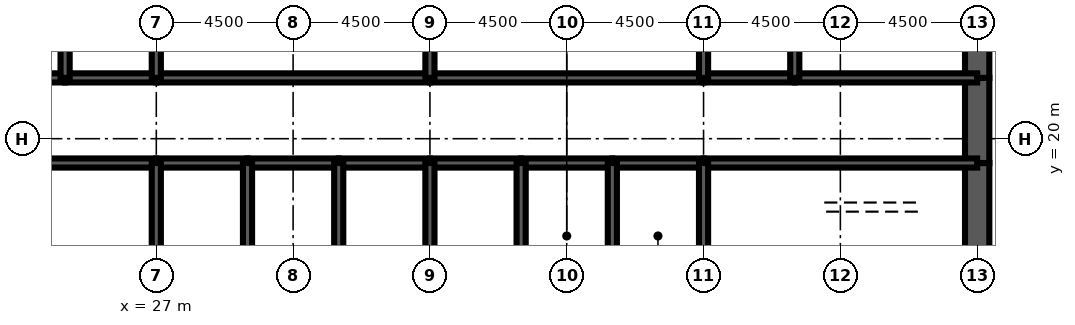
"""IFC4 building model, lengths in metres.
Left out: names, types, materials, properties, quantities, classifications, styles, units other than length and angle.
Written with IfcOpenShell. Run it as: python <this file> out.ifc"""

import sys

from ifc_helpers import new_model, si_unit, direction, frame, frame_2d, origin, place, context, subcontext, project, spatial, rectangle, extrude, element, fill, save


model = new_model("IFC4")
c1 = context("Model", 3, precision=1e-05, world=origin(), true_north=direction((0.0, 1.0)))
c2 = subcontext(c1, "Body", "Model", "MODEL_VIEW")
j1 = project(units=[si_unit("LENGTHUNIT", "METRE"), si_unit("PLANEANGLEUNIT", "RADIAN")], contexts=[c1])
p1 = place(None, origin())
s1 = spatial("IfcSite", under=j1, at=p1, CompositionType="ELEMENT")
p2 = place(p1, origin())
s2 = spatial("IfcBuilding", under=s1, at=p2, CompositionType="ELEMENT")
p3 = place(p2, frame((0.0, 0.0, 219.4)))
s3 = spatial("IfcBuildingStorey", under=s2, at=p3, CompositionType="ELEMENT", Elevation=219.4)
p4 = place(p3, frame((54.0, 16.0, 0.0), z_axis=(0.0, 0.0, 1.0), x_axis=(0.0, 1.0, 0.0)))
e1 = element("IfcWall", 1, at=p4, inside=s3, PredefinedType="SHEAR", context=c2, shape_type="SweptSolid", body=[
    extrude(rectangle(XDim=3.2, YDim=0.8, at=frame_2d((1.6, 0.0))), origin(), (0.0, 0.0, 1.0), 4.2),
])
p5 = place(p3, frame((54.0, 19.2, 0.0), z_axis=(0.0, 0.0, 1.0), x_axis=(0.0, 1.0, 0.0)))
e2 = element("IfcWall", 2, at=p5, inside=s3, PredefinedType="SHEAR", context=c2, shape_type="SweptSolid", body=[
    extrude(rectangle(XDim=2.8, YDim=0.8, at=frame_2d((1.4, 0.0))), origin(), (0.0, 0.0, 1.0), 4.2),
])
p6 = place(p5, frame((0.4, 0.0, 0.0)))
e3 = element("IfcOpeningElement", 3, at=p6, cuts=e2, PredefinedType="OPENING", context=c2, shape_type="SweptSolid", body=[
    extrude(rectangle(XDim=1.8, YDim=2.1, at=frame_2d((0.9, 1.05))), frame((0.0, 0.41, 0.0), z_axis=(0.0, -1.0, 0.0), x_axis=(1.0, 0.0, 0.0)), (0.0, 0.0, 1.0), 0.82),
])
p7 = place(p3, frame((54.0, 22.0, 0.0), z_axis=(0.0, 0.0, 1.0), x_axis=(0.0, 1.0, 0.0)))
e4 = element("IfcWall", 4, at=p7, inside=s3, PredefinedType="SHEAR", context=c2, shape_type="SweptSolid", body=[
    extrude(rectangle(XDim=4.0, YDim=0.8, at=frame_2d((2.0, 0.0))), origin(), (0.0, 0.0, 1.0), 4.2),
])
p8 = place(p3, frame((18.0, 19.2, 0.0), z_axis=(0.0, 0.0, 1.0), x_axis=(1.0, 0.0, 0.0)))
e5 = element("IfcWall", 5, at=p8, inside=s3, PredefinedType="SOLIDWALL", context=c2, shape_type="SweptSolid", body=[
    extrude(rectangle(XDim=9.0, YDim=0.3, at=frame_2d((4.5, 0.0))), origin(), (0.0, 0.0, 1.0), 4.2),
])
p9 = place(p8, frame((0.65, 0.0, 0.0)))
e6 = element("IfcOpeningElement", 6, at=p9, cuts=e5, PredefinedType="OPENING", context=c2, shape_type="SweptSolid", body=[
    extrude(rectangle(XDim=1.0, YDim=2.1, at=frame_2d((0.5, 1.05))), frame((0.0, 0.16, 0.0), z_axis=(0.0, -1.0, 0.0), x_axis=(1.0, 0.0, 0.0)), (0.0, 0.0, 1.0), 0.32),
])
p10 = place(p3, frame((27.0, 19.2, 0.0), z_axis=(0.0, 0.0, 1.0), x_axis=(1.0, 0.0, 0.0)))
e7 = element("IfcWall", 7, at=p10, inside=s3, PredefinedType="SOLIDWALL", context=c2, shape_type="SweptSolid", body=[
    extrude(rectangle(XDim=3.0, YDim=0.3, at=frame_2d((1.5, 0.0))), origin(), (0.0, 0.0, 1.0), 4.2),
])
p11 = place(p10, frame((0.95, 0.0, 0.0)))
e8 = element("IfcOpeningElement", 8, at=p11, cuts=e7, PredefinedType="OPENING", context=c2, shape_type="SweptSolid", body=[
    extrude(rectangle(XDim=1.1, YDim=2.2, at=frame_2d((0.55, 1.1))), frame((0.0, 0.16, 0.0), z_axis=(0.0, -1.0, 0.0), x_axis=(1.0, 0.0, 0.0)), (0.0, 0.0, 1.0), 0.32),
])
p12 = place(p3, frame((30.0, 19.2, 0.0), z_axis=(0.0, 0.0, 1.0), x_axis=(1.0, 0.0, 0.0)))
e9 = element("IfcWall", 9, at=p12, inside=s3, PredefinedType="SOLIDWALL", context=c2, shape_type="SweptSolid", body=[
    extrude(rectangle(XDim=3.0, YDim=0.3, at=frame_2d((1.5, 0.0))), origin(), (0.0, 0.0, 1.0), 4.2),
])
p13 = place(p12, frame((0.95, 0.0, 0.0)))
e10 = element("IfcOpeningElement", 10, at=p13, cuts=e9, PredefinedType="OPENING", context=c2, shape_type="SweptSolid", body=[
    extrude(rectangle(XDim=1.1, YDim=2.2, at=frame_2d((0.55, 1.1))), frame((0.0, 0.16, 0.0), z_axis=(0.0, -1.0, 0.0), x_axis=(1.0, 0.0, 0.0)), (0.0, 0.0, 1.0), 0.32),
])
p14 = place(p3, frame((33.0, 19.2, 0.0), z_axis=(0.0, 0.0, 1.0), x_axis=(1.0, 0.0, 0.0)))
e11 = element("IfcWall", 11, at=p14, inside=s3, PredefinedType="SOLIDWALL", context=c2, shape_type="SweptSolid", body=[
    extrude(rectangle(XDim=3.0, YDim=0.3, at=frame_2d((1.5, 0.0))), origin(), (0.0, 0.0, 1.0), 4.2),
])
p15 = place(p14, frame((0.95, 0.0, 0.0)))
e12 = element("IfcOpeningElement", 12, at=p15, cuts=e11, PredefinedType="OPENING", context=c2, shape_type="SweptSolid", body=[
    extrude(rectangle(XDim=1.1, YDim=2.2, at=frame_2d((0.55, 1.1))), frame((0.0, 0.16, 0.0), z_axis=(0.0, -1.0, 0.0), x_axis=(1.0, 0.0, 0.0)), (0.0, 0.0, 1.0), 0.32),
])
p16 = place(p3, frame((36.0, 19.2, 0.0), z_axis=(0.0, 0.0, 1.0), x_axis=(1.0, 0.0, 0.0)))
e13 = element("IfcWall", 13, at=p16, inside=s3, PredefinedType="SOLIDWALL", context=c2, shape_type="SweptSolid", body=[
    extrude(rectangle(XDim=3.0, YDim=0.3, at=frame_2d((1.5, 0.0))), origin(), (0.0, 0.0, 1.0), 4.2),
])
p17 = place(p16, frame((0.95, 0.0, 0.0)))
e14 = element("IfcOpeningElement", 14, at=p17, cuts=e13, PredefinedType="OPENING", context=c2, shape_type="SweptSolid", body=[
    extrude(rectangle(XDim=1.1, YDim=2.2, at=frame_2d((0.55, 1.1))), frame((0.0, 0.16, 0.0), z_axis=(0.0, -1.0, 0.0), x_axis=(1.0, 0.0, 0.0)), (0.0, 0.0, 1.0), 0.32),
])
p18 = place(p3, frame((39.0, 19.2, 0.0), z_axis=(0.0, 0.0, 1.0), x_axis=(1.0, 0.0, 0.0)))
e15 = element("IfcWall", 15, at=p18, inside=s3, PredefinedType="SOLIDWALL", context=c2, shape_type="SweptSolid", body=[
    extrude(rectangle(XDim=3.0, YDim=0.3, at=frame_2d((1.5, 0.0))), origin(), (0.0, 0.0, 1.0), 4.2),
])
p19 = place(p18, frame((1.0, 0.0, 0.0)))
e16 = element("IfcOpeningElement", 16, at=p19, cuts=e15, PredefinedType="OPENING", context=c2, shape_type="SweptSolid", body=[
    extrude(rectangle(XDim=1.0, YDim=2.1, at=frame_2d((0.5, 1.05))), frame((0.0, 0.16, 0.0), z_axis=(0.0, -1.0, 0.0), x_axis=(1.0, 0.0, 0.0)), (0.0, 0.0, 1.0), 0.32),
])
p20 = place(p3, frame((42.0, 19.2, 0.0), z_axis=(0.0, 0.0, 1.0), x_axis=(1.0, 0.0, 0.0)))
e17 = element("IfcWall", 17, at=p20, inside=s3, PredefinedType="SOLIDWALL", context=c2, shape_type="SweptSolid", body=[
    extrude(rectangle(XDim=3.0, YDim=0.3, at=frame_2d((1.5, 0.0))), origin(), (0.0, 0.0, 1.0), 4.2),
])
p21 = place(p20, frame((1.0, 0.0, 0.0)))
e18 = element("IfcOpeningElement", 18, at=p21, cuts=e17, PredefinedType="OPENING", context=c2, shape_type="SweptSolid", body=[
    extrude(rectangle(XDim=1.0, YDim=2.1, at=frame_2d((0.5, 1.05))), frame((0.0, 0.16, 0.0), z_axis=(0.0, -1.0, 0.0), x_axis=(1.0, 0.0, 0.0)), (0.0, 0.0, 1.0), 0.32),
])
p22 = place(p3, frame((45.0, 19.2, 0.0), z_axis=(0.0, 0.0, 1.0), x_axis=(1.0, 0.0, 0.0)))
e19 = element("IfcWall", 19, at=p22, inside=s3, PredefinedType="SOLIDWALL", context=c2, shape_type="SweptSolid", body=[
    extrude(rectangle(XDim=9.0, YDim=0.3, at=frame_2d((4.5, 0.0))), origin(), (0.0, 0.0, 1.0), 4.2),
])
p23 = place(p22, frame((7.35, 0.0, 0.0)))
e20 = element("IfcOpeningElement", 20, at=p23, cuts=e19, PredefinedType="OPENING", context=c2, shape_type="SweptSolid", body=[
    extrude(rectangle(XDim=1.0, YDim=2.1, at=frame_2d((0.5, 1.05))), frame((0.0, 0.16, 0.0), z_axis=(0.0, -1.0, 0.0), x_axis=(1.0, 0.0, 0.0)), (0.0, 0.0, 1.0), 0.32),
])
p24 = place(p3, frame((18.0, 22.0, 0.0), z_axis=(0.0, 0.0, 1.0), x_axis=(1.0, 0.0, 0.0)))
e21 = element("IfcWall", 21, at=p24, inside=s3, PredefinedType="SOLIDWALL", context=c2, shape_type="SweptSolid", body=[
    extrude(rectangle(XDim=6.0, YDim=0.3, at=frame_2d((3.0, 0.0))), origin(), (0.0, 0.0, 1.0), 4.2),
])
p25 = place(p24, frame((4.4, 0.0, 0.0)))
e22 = element("IfcOpeningElement", 22, at=p25, cuts=e21, PredefinedType="OPENING", context=c2, shape_type="SweptSolid", body=[
    extrude(rectangle(XDim=1.0, YDim=2.1, at=frame_2d((0.5, 1.05))), frame((0.0, 0.16, 0.0), z_axis=(0.0, -1.0, 0.0), x_axis=(1.0, 0.0, 0.0)), (0.0, 0.0, 1.0), 0.32),
])
p26 = place(p24, frame((0.8, 0.0, 0.0)))
e23 = element("IfcOpeningElement", 23, at=p26, cuts=e21, PredefinedType="OPENING", context=c2, shape_type="SweptSolid", body=[
    extrude(rectangle(XDim=1.0, YDim=2.1, at=frame_2d((0.5, 1.05))), frame((0.0, 0.16, 0.0), z_axis=(0.0, -1.0, 0.0), x_axis=(1.0, 0.0, 0.0)), (0.0, 0.0, 1.0), 0.32),
])
p27 = place(p3, frame((24.0, 22.0, 0.0), z_axis=(0.0, 0.0, 1.0), x_axis=(1.0, 0.0, 0.0)))
e24 = element("IfcWall", 24, at=p27, inside=s3, PredefinedType="SOLIDWALL", context=c2, shape_type="SweptSolid", body=[
    extrude(rectangle(XDim=3.0, YDim=0.3, at=frame_2d((1.5, 0.0))), origin(), (0.0, 0.0, 1.0), 4.2),
])
p28 = place(p27, frame((1.0, 0.0, 0.0)))
e25 = element("IfcOpeningElement", 25, at=p28, cuts=e24, PredefinedType="OPENING", context=c2, shape_type="SweptSolid", body=[
    extrude(rectangle(XDim=1.0, YDim=2.1, at=frame_2d((0.5, 1.05))), frame((0.0, 0.16, 0.0), z_axis=(0.0, -1.0, 0.0), x_axis=(1.0, 0.0, 0.0)), (0.0, 0.0, 1.0), 0.32),
])
p29 = place(p3, frame((27.0, 22.0, 0.0), z_axis=(0.0, 0.0, 1.0), x_axis=(1.0, 0.0, 0.0)))
e26 = element("IfcWall", 26, at=p29, inside=s3, PredefinedType="SOLIDWALL", context=c2, shape_type="SweptSolid", body=[
    extrude(rectangle(XDim=9.0, YDim=0.3, at=frame_2d((4.5, 0.0))), origin(), (0.0, 0.0, 1.0), 4.2),
])
p30 = place(p29, frame((4.0, 0.0, 0.0)))
e27 = element("IfcOpeningElement", 27, at=p30, cuts=e26, PredefinedType="OPENING", context=c2, shape_type="SweptSolid", body=[
    extrude(rectangle(XDim=1.0, YDim=2.1, at=frame_2d((0.5, 1.05))), frame((0.0, 0.16, 0.0), z_axis=(0.0, -1.0, 0.0), x_axis=(1.0, 0.0, 0.0)), (0.0, 0.0, 1.0), 0.32),
])
p31 = place(p3, frame((36.0, 22.0, 0.0), z_axis=(0.0, 0.0, 1.0), x_axis=(1.0, 0.0, 0.0)))
e28 = element("IfcWall", 28, at=p31, inside=s3, PredefinedType="SOLIDWALL", context=c2, shape_type="SweptSolid", body=[
    extrude(rectangle(XDim=9.0, YDim=0.3, at=frame_2d((4.5, 0.0))), origin(), (0.0, 0.0, 1.0), 4.2),
])
p32 = place(p31, frame((4.0, 0.0, 0.0)))
e29 = element("IfcOpeningElement", 29, at=p32, cuts=e28, PredefinedType="OPENING", context=c2, shape_type="SweptSolid", body=[
    extrude(rectangle(XDim=1.0, YDim=2.1, at=frame_2d((0.5, 1.05))), frame((0.0, 0.16, 0.0), z_axis=(0.0, -1.0, 0.0), x_axis=(1.0, 0.0, 0.0)), (0.0, 0.0, 1.0), 0.32),
])
p33 = place(p3, frame((45.0, 22.0, 0.0), z_axis=(0.0, 0.0, 1.0), x_axis=(1.0, 0.0, 0.0)))
e30 = element("IfcWall", 30, at=p33, inside=s3, PredefinedType="SOLIDWALL", context=c2, shape_type="SweptSolid", body=[
    extrude(rectangle(XDim=3.0, YDim=0.3, at=frame_2d((1.5, 0.0))), origin(), (0.0, 0.0, 1.0), 4.2),
])
p34 = place(p33, frame((1.0, 0.0, 0.0)))
e31 = element("IfcOpeningElement", 31, at=p34, cuts=e30, PredefinedType="OPENING", context=c2, shape_type="SweptSolid", body=[
    extrude(rectangle(XDim=1.0, YDim=2.1, at=frame_2d((0.5, 1.05))), frame((0.0, 0.16, 0.0), z_axis=(0.0, -1.0, 0.0), x_axis=(1.0, 0.0, 0.0)), (0.0, 0.0, 1.0), 0.32),
])
p35 = place(p3, frame((48.0, 22.0, 0.0), z_axis=(0.0, 0.0, 1.0), x_axis=(1.0, 0.0, 0.0)))
e32 = element("IfcWall", 32, at=p35, inside=s3, PredefinedType="SOLIDWALL", context=c2, shape_type="SweptSolid", body=[
    extrude(rectangle(XDim=6.0, YDim=0.3, at=frame_2d((3.0, 0.0))), origin(), (0.0, 0.0, 1.0), 4.2),
])
p36 = place(p35, frame((2.0, 0.0, 0.0)))
e33 = element("IfcOpeningElement", 33, at=p36, cuts=e32, PredefinedType="OPENING", context=c2, shape_type="SweptSolid", body=[
    extrude(rectangle(XDim=1.0, YDim=2.1, at=frame_2d((0.5, 1.05))), frame((0.0, 0.16, 0.0), z_axis=(0.0, -1.0, 0.0), x_axis=(1.0, 0.0, 0.0)), (0.0, 0.0, 1.0), 0.32),
])
p37 = place(p35, frame((4.05, 0.0, 0.0)))
e34 = element("IfcOpeningElement", 34, at=p37, cuts=e32, PredefinedType="OPENING", context=c2, shape_type="SweptSolid", body=[
    extrude(rectangle(XDim=1.0, YDim=2.1, at=frame_2d((0.5, 1.05))), frame((0.0, 0.16, 0.0), z_axis=(0.0, -1.0, 0.0), x_axis=(1.0, 0.0, 0.0)), (0.0, 0.0, 1.0), 0.32),
])
for number, where, z_axis, x_axis in (
    (35, (27.0, 16.0, 0.0), (0.0, 0.0, 1.0), (0.0, 1.0, 0.0)),
    (36, (30.0, 16.0, 0.0), (0.0, 0.0, 1.0), (0.0, 1.0, 0.0)),
    (37, (33.0, 16.0, 0.0), (0.0, 0.0, 1.0), (0.0, 1.0, 0.0)),
    (38, (36.0, 16.0, 0.0), (0.0, 0.0, 1.0), (0.0, 1.0, 0.0)),
    (39, (39.0, 16.0, 0.0), (0.0, 0.0, 1.0), (0.0, 1.0, 0.0)),
    (40, (42.0, 16.0, 0.0), (0.0, 0.0, 1.0), (0.0, 1.0, 0.0)),
    (41, (45.0, 16.0, 0.0), (0.0, 0.0, 1.0), (0.0, 1.0, 0.0)),
):
    element("IfcWall", number, at=place(p3, frame(where, z_axis=z_axis, x_axis=x_axis)), inside=s3, PredefinedType="SOLIDWALL", context=c2, shape_type="SweptSolid", body=[
        extrude(rectangle(XDim=3.2, YDim=0.3, at=frame_2d((1.6, 0.0))), origin(), (0.0, 0.0, 1.0), 4.2),
    ])
for number, where, z_axis, x_axis in (
    (42, (24.0, 22.0, 0.0), (0.0, 0.0, 1.0), (0.0, 1.0, 0.0)),
    (43, (27.0, 22.0, 0.0), (0.0, 0.0, 1.0), (0.0, 1.0, 0.0)),
    (44, (36.0, 22.0, 0.0), (0.0, 0.0, 1.0), (0.0, 1.0, 0.0)),
    (45, (45.0, 22.0, 0.0), (0.0, 0.0, 1.0), (0.0, 1.0, 0.0)),
    (46, (48.0, 22.0, 0.0), (0.0, 0.0, 1.0), (0.0, 1.0, 0.0)),
):
    element("IfcWall", number, at=place(p3, frame(where, z_axis=z_axis, x_axis=x_axis)), inside=s3, PredefinedType="SOLIDWALL", context=c2, shape_type="SweptSolid", body=[
        extrude(rectangle(XDim=4.0, YDim=0.3, at=frame_2d((2.0, 0.0))), origin(), (0.0, 0.0, 1.0), 4.2),
    ])
p38 = place(p3, frame((39.15, 17.35, 0.0), z_axis=(0.0, 0.0, 1.0), x_axis=(1.0, 0.0, 0.0)))
e47 = element("IfcWall", 47, at=p38, inside=s3, PredefinedType="SOLIDWALL", context=c2, shape_type="SweptSolid", body=[
    extrude(rectangle(XDim=2.7, YDim=0.3, at=frame_2d((1.35, 0.0))), origin(), (0.0, 0.0, 1.0), 4.04),
])
p39 = place(p38, frame((0.85, 0.0, 0.0)))
e48 = element("IfcOpeningElement", 48, at=p39, cuts=e47, PredefinedType="OPENING", context=c2, shape_type="SweptSolid", body=[
    extrude(rectangle(XDim=1.0, YDim=2.1, at=frame_2d((0.5, 1.05))), frame((0.0, 0.16, 0.0), z_axis=(0.0, -1.0, 0.0), x_axis=(1.0, 0.0, 0.0)), (0.0, 0.0, 1.0), 0.32),
])
p40 = place(p3, frame((42.15, 17.35, 0.0), z_axis=(0.0, 0.0, 1.0), x_axis=(1.0, 0.0, 0.0)))
e49 = element("IfcWall", 49, at=p40, inside=s3, PredefinedType="SOLIDWALL", context=c2, shape_type="SweptSolid", body=[
    extrude(rectangle(XDim=2.7, YDim=0.3, at=frame_2d((1.35, 0.0))), origin(), (0.0, 0.0, 1.0), 4.04),
])
p41 = place(p40, frame((0.85, 0.0, 0.0)))
e50 = element("IfcOpeningElement", 50, at=p41, cuts=e49, PredefinedType="OPENING", context=c2, shape_type="SweptSolid", body=[
    extrude(rectangle(XDim=1.0, YDim=2.1, at=frame_2d((0.5, 1.05))), frame((0.0, 0.16, 0.0), z_axis=(0.0, -1.0, 0.0), x_axis=(1.0, 0.0, 0.0)), (0.0, 0.0, 1.0), 0.32),
])
p42 = place(p3, frame((38.5, 22.15, 0.0), z_axis=(0.0, 0.0, 1.0), x_axis=(0.0, 1.0, 0.0)))
e51 = element("IfcWall", 51, at=p42, inside=s3, PredefinedType="PARTITIONING", context=c2, shape_type="SweptSolid", body=[
    extrude(rectangle(XDim=3.7, YDim=0.15, at=frame_2d((1.85, 0.0))), origin(), (0.0, 0.0, 1.0), 3.0),
])
p43 = place(p42, frame((2.2, 0.0, 0.0)))
e52 = element("IfcOpeningElement", 52, at=p43, cuts=e51, PredefinedType="OPENING", context=c2, shape_type="SweptSolid", body=[
    extrude(rectangle(XDim=1.0, YDim=2.1, at=frame_2d((0.5, 1.05))), frame((0.0, 0.085, 0.0), z_axis=(0.0, -1.0, 0.0), x_axis=(1.0, 0.0, 0.0)), (0.0, 0.0, 1.0), 0.17),
])
p44 = place(p3, frame((51.425, 22.15, 0.0), z_axis=(0.0, 0.0, 1.0), x_axis=(0.0, 1.0, 0.0)))
e53 = element("IfcWall", 53, at=p44, inside=s3, PredefinedType="PARTITIONING", context=c2, shape_type="SweptSolid", body=[
    extrude(rectangle(XDim=3.7, YDim=0.15, at=frame_2d((1.85, 0.0))), origin(), (0.0, 0.0, 1.0), 3.0),
])
p45 = place(p3, frame((24.5, 19.35, 0.0), z_axis=(0.0, 0.0, 1.0), x_axis=(0.0, 1.0, 0.0)))
e54 = element("IfcWall", 54, at=p45, inside=s3, PredefinedType="PARTITIONING", context=c2, shape_type="SweptSolid", body=[
    extrude(rectangle(XDim=2.5, YDim=0.15, at=frame_2d((1.25, 0.0))), origin(), (0.0, 0.0, 1.0), 3.0),
])
p46 = place(p45, frame((1.15, 0.0, 0.0)))
e55 = element("IfcOpeningElement", 55, at=p46, cuts=e54, PredefinedType="OPENING", context=c2, shape_type="SweptSolid", body=[
    extrude(rectangle(XDim=1.0, YDim=2.1, at=frame_2d((0.5, 1.05))), frame((0.0, 0.085, 0.0), z_axis=(0.0, -1.0, 0.0), x_axis=(1.0, 0.0, 0.0)), (0.0, 0.0, 1.0), 0.17),
])
p47 = place(p39, origin())
e56 = element("IfcDoor", 56, at=p47, inside=s3, OperationType="SINGLE_SWING_LEFT", PredefinedType="DOOR", context=c2, shape_type="SweptSolid", body=[
    extrude(rectangle(XDim=1.0, YDim=2.1, at=frame_2d((0.5, 1.05))), frame((0.0, 0.025, 0.0), z_axis=(0.0, -1.0, 0.0), x_axis=(1.0, 0.0, 0.0)), (0.0, 0.0, 1.0), 0.05),
])
fill(e48, e56)
p48 = place(p41, origin())
e57 = element("IfcDoor", 57, at=p48, inside=s3, OperationType="SINGLE_SWING_LEFT", PredefinedType="DOOR", context=c2, shape_type="SweptSolid", body=[
    extrude(rectangle(XDim=1.0, YDim=2.1, at=frame_2d((0.5, 1.05))), frame((0.0, 0.025, 0.0), z_axis=(0.0, -1.0, 0.0), x_axis=(1.0, 0.0, 0.0)), (0.0, 0.0, 1.0), 0.05),
])
fill(e50, e57)
p49 = place(p46, origin())
e58 = element("IfcDoor", 58, at=p49, inside=s3, OperationType="SINGLE_SWING_RIGHT", PredefinedType="DOOR", context=c2, shape_type="SweptSolid", body=[
    extrude(rectangle(XDim=1.0, YDim=2.1, at=frame_2d((0.5, 1.05))), frame((0.0, 0.025, 0.0), z_axis=(0.0, -1.0, 0.0), x_axis=(1.0, 0.0, 0.0)), (0.0, 0.0, 1.0), 0.05),
])
fill(e55, e58)
p50 = place(p11, origin())
e59 = element("IfcDoor", 59, at=p50, inside=s3, OperationType="DOUBLE_DOOR_SLIDING", PredefinedType="USERDEFINED", context=c2, shape_type="SweptSolid", body=[
    extrude(rectangle(XDim=1.1, YDim=2.2, at=frame_2d((0.55, 1.1))), frame((0.0, 0.025, 0.0), z_axis=(0.0, -1.0, 0.0), x_axis=(1.0, 0.0, 0.0)), (0.0, 0.0, 1.0), 0.05),
])
fill(e8, e59)
p51 = place(p13, origin())
e60 = element("IfcDoor", 60, at=p51, inside=s3, OperationType="DOUBLE_DOOR_SLIDING", PredefinedType="USERDEFINED", context=c2, shape_type="SweptSolid", body=[
    extrude(rectangle(XDim=1.1, YDim=2.2, at=frame_2d((0.55, 1.1))), frame((0.0, 0.025, 0.0), z_axis=(0.0, -1.0, 0.0), x_axis=(1.0, 0.0, 0.0)), (0.0, 0.0, 1.0), 0.05),
])
fill(e10, e60)
p52 = place(p15, origin())
e61 = element("IfcDoor", 61, at=p52, inside=s3, OperationType="DOUBLE_DOOR_SLIDING", PredefinedType="USERDEFINED", context=c2, shape_type="SweptSolid", body=[
    extrude(rectangle(XDim=1.1, YDim=2.2, at=frame_2d((0.55, 1.1))), frame((0.0, 0.025, 0.0), z_axis=(0.0, -1.0, 0.0), x_axis=(1.0, 0.0, 0.0)), (0.0, 0.0, 1.0), 0.05),
])
fill(e12, e61)
p53 = place(p17, origin())
e62 = element("IfcDoor", 62, at=p53, inside=s3, OperationType="DOUBLE_DOOR_SLIDING", PredefinedType="USERDEFINED", context=c2, shape_type="SweptSolid", body=[
    extrude(rectangle(XDim=1.1, YDim=2.2, at=frame_2d((0.55, 1.1))), frame((0.0, 0.025, 0.0), z_axis=(0.0, -1.0, 0.0), x_axis=(1.0, 0.0, 0.0)), (0.0, 0.0, 1.0), 0.05),
])
fill(e14, e62)
p54 = place(p23, origin())
e63 = element("IfcDoor", 63, at=p54, inside=s3, OperationType="SINGLE_SWING_RIGHT", PredefinedType="DOOR", context=c2, shape_type="SweptSolid", body=[
    extrude(rectangle(XDim=1.0, YDim=2.1, at=frame_2d((0.5, 1.05))), frame((0.0, 0.025, 0.0), z_axis=(0.0, -1.0, 0.0), x_axis=(1.0, 0.0, 0.0)), (0.0, 0.0, 1.0), 0.05),
])
fill(e20, e63)
p55 = place(p6, origin())
e64 = element("IfcDoor", 64, at=p55, inside=s3, OperationType="SINGLE_SWING_LEFT", PredefinedType="DOOR", context=c2, shape_type="SweptSolid", body=[
    extrude(rectangle(XDim=1.8, YDim=2.1, at=frame_2d((0.9, 1.05))), frame((0.0, 0.4, 0.0), z_axis=(0.0, -1.0, 0.0), x_axis=(1.0, 0.0, 0.0)), (0.0, 0.0, 1.0), 0.8),
])
fill(e3, e64)
p56 = place(p28, origin())
e65 = element("IfcDoor", 65, at=p56, inside=s3, OperationType="SINGLE_SWING_LEFT", PredefinedType="DOOR", context=c2, shape_type="SweptSolid", body=[
    extrude(rectangle(XDim=1.0, YDim=2.1, at=frame_2d((0.5, 1.05))), frame((0.0, 0.025, 0.0), z_axis=(0.0, -1.0, 0.0), x_axis=(1.0, 0.0, 0.0)), (0.0, 0.0, 1.0), 0.05),
])
fill(e25, e65)
p57 = place(p30, origin())
e66 = element("IfcDoor", 66, at=p57, inside=s3, OperationType="SINGLE_SWING_LEFT", PredefinedType="DOOR", context=c2, shape_type="SweptSolid", body=[
    extrude(rectangle(XDim=1.0, YDim=2.1, at=frame_2d((0.5, 1.05))), frame((0.0, 0.025, 0.0), z_axis=(0.0, -1.0, 0.0), x_axis=(1.0, 0.0, 0.0)), (0.0, 0.0, 1.0), 0.05),
])
fill(e27, e66)
p58 = place(p32, origin())
e67 = element("IfcDoor", 67, at=p58, inside=s3, OperationType="SINGLE_SWING_LEFT", PredefinedType="DOOR", context=c2, shape_type="SweptSolid", body=[
    extrude(rectangle(XDim=1.0, YDim=2.1, at=frame_2d((0.5, 1.05))), frame((0.0, 0.025, 0.0), z_axis=(0.0, -1.0, 0.0), x_axis=(1.0, 0.0, 0.0)), (0.0, 0.0, 1.0), 0.05),
])
fill(e29, e67)
p59 = place(p34, origin())
e68 = element("IfcDoor", 68, at=p59, inside=s3, OperationType="SINGLE_SWING_LEFT", PredefinedType="DOOR", context=c2, shape_type="SweptSolid", body=[
    extrude(rectangle(XDim=1.0, YDim=2.1, at=frame_2d((0.5, 1.05))), frame((0.0, 0.025, 0.0), z_axis=(0.0, -1.0, 0.0), x_axis=(1.0, 0.0, 0.0)), (0.0, 0.0, 1.0), 0.05),
])
fill(e31, e68)
p60 = place(p36, origin())
e69 = element("IfcDoor", 69, at=p60, inside=s3, OperationType="SINGLE_SWING_LEFT", PredefinedType="DOOR", context=c2, shape_type="SweptSolid", body=[
    extrude(rectangle(XDim=1.0, YDim=2.1, at=frame_2d((0.5, 1.05))), frame((0.0, 0.025, 0.0), z_axis=(0.0, -1.0, 0.0), x_axis=(1.0, 0.0, 0.0)), (0.0, 0.0, 1.0), 0.05),
])
fill(e33, e69)
p61 = place(p37, origin())
e70 = element("IfcDoor", 70, at=p61, inside=s3, OperationType="SINGLE_SWING_RIGHT", PredefinedType="DOOR", context=c2, shape_type="SweptSolid", body=[
    extrude(rectangle(XDim=1.0, YDim=2.1, at=frame_2d((0.5, 1.05))), frame((0.0, 0.025, 0.0), z_axis=(0.0, -1.0, 0.0), x_axis=(1.0, 0.0, 0.0)), (0.0, 0.0, 1.0), 0.05),
])
fill(e34, e70)
p62 = place(p19, origin())
e71 = element("IfcDoor", 71, at=p62, inside=s3, OperationType="SINGLE_SWING_LEFT", PredefinedType="DOOR", context=c2, shape_type="SweptSolid", body=[
    extrude(rectangle(XDim=1.0, YDim=2.1, at=frame_2d((0.5, 1.05))), frame((0.0, 0.025, 0.0), z_axis=(0.0, -1.0, 0.0), x_axis=(1.0, 0.0, 0.0)), (0.0, 0.0, 1.0), 0.05),
])
fill(e16, e71)
p63 = place(p21, origin())
e72 = element("IfcDoor", 72, at=p63, inside=s3, OperationType="SINGLE_SWING_LEFT", PredefinedType="DOOR", context=c2, shape_type="SweptSolid", body=[
    extrude(rectangle(XDim=1.0, YDim=2.1, at=frame_2d((0.5, 1.05))), frame((0.0, 0.025, 0.0), z_axis=(0.0, -1.0, 0.0), x_axis=(1.0, 0.0, 0.0)), (0.0, 0.0, 1.0), 0.05),
])
fill(e18, e72)
save(model, sys.argv[1])
